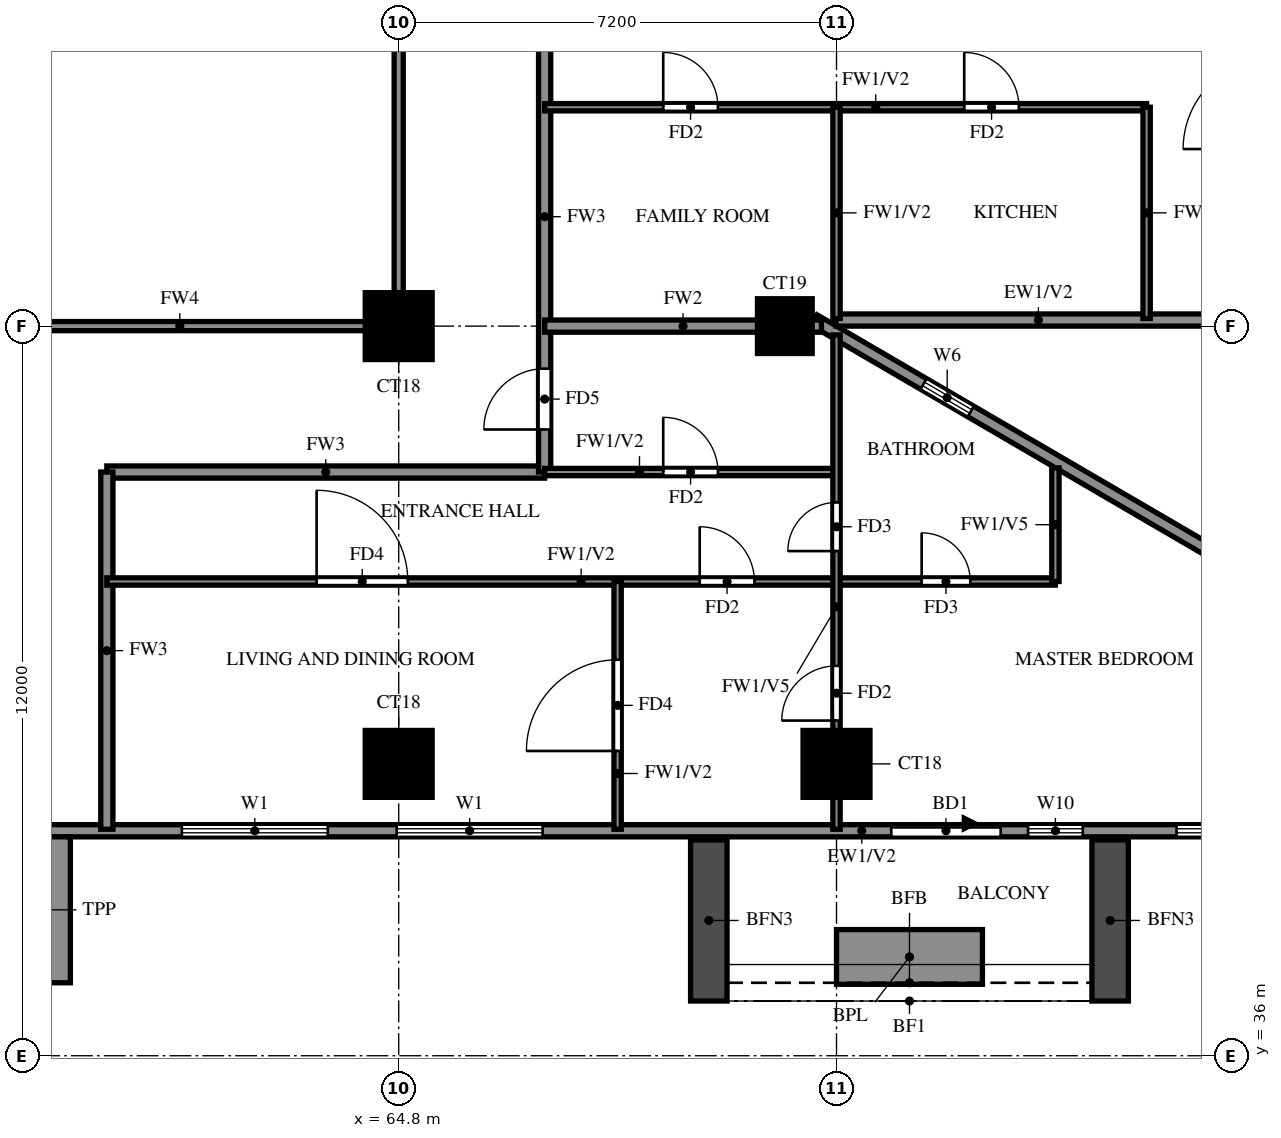
"""IFC4 building model, lengths in metres.
Left out: names, types, materials, properties, quantities, classifications, styles, units other than length and angle.
Written with IfcOpenShell. Run it as: python <this file> out.ifc"""

import sys

from ifc_helpers import new_model, si_unit, direction, frame, frame_2d, origin, origin_2d, place, context, subcontext, project, spatial, rectangle, extrude, source, transform, mapped, element, fill, save


model = new_model("IFC4")
c1 = context("Model", 3, precision=1e-05, world=origin(), true_north=direction((0.0, 1.0)))
c2 = subcontext(c1, "Body", "Model", "MODEL_VIEW")
j1 = project(units=[si_unit("LENGTHUNIT", "METRE"), si_unit("PLANEANGLEUNIT", "RADIAN")], contexts=[c1])
p1 = place(None, origin())
s1 = spatial("IfcSite", under=j1, at=p1, CompositionType="ELEMENT")
p2 = place(p1, origin())
s2 = spatial("IfcBuilding", under=s1, at=p2, CompositionType="ELEMENT")
p3 = place(p2, frame((0.0, 0.0, 123.5)))
s3 = spatial("IfcBuildingStorey", under=s2, at=p3, CompositionType="ELEMENT", Elevation=123.5)
m1 = source(origin(), c2, "Body", "SweptSolid", [
    extrude(rectangle(XDim=1.1, YDim=1.1, at=origin_2d()), origin(), (0.0, 0.0, 1.0), 3.2),
])
for number, where, z_axis, x_axis in (
    (1, (64.8, 40.8, 0.0), (0.0, 0.0, 1.0), (1.0, 0.0, 0.0)),
    (2, (72.0, 40.8, 0.0), (0.0, 0.0, 1.0), (1.0, 0.0, 0.0)),
    (3, (64.8, 48.0, 0.0), (0.0, 0.0, 1.0), (1.0, 0.0, 0.0)),
):
    element("IfcColumn", number, at=place(p3, frame(where, z_axis=z_axis, x_axis=x_axis)), inside=s3, PredefinedType="COLUMN", context=c2, shape_type="MappedRepresentation", body=[
        mapped(m1, transform((0.0, 0.0, 0.0))),
    ])
m2 = source(origin(), c2, "Body", "SweptSolid", [
    extrude(rectangle(XDim=0.9, YDim=0.9, at=origin_2d()), origin(), (0.0, 0.0, 1.0), 3.2),
])
p4 = place(p3, frame((71.15, 48.0, 0.0), z_axis=(0.0, 0.0, 1.0), x_axis=(1.0, 0.0, 0.0)))
e4 = element("IfcColumn", 4, at=p4, inside=s3, PredefinedType="COLUMN", context=c2, shape_type="MappedRepresentation", body=[
    mapped(m2, transform((0.0, 0.0, 0.0))),
])
p5 = place(p3, frame((85.719, 39.881, 0.0), z_axis=(0.0, 0.0, 1.0), x_axis=(-0.86377618652, 0.503875678716, 0.0)))
e5 = element("IfcWall", 5, at=p5, inside=s3, PredefinedType="SOLIDWALL", context=c2, shape_type="SweptSolid", body=[
    extrude(rectangle(XDim=16.311, YDim=0.2, at=frame_2d((8.156, 0.0))), origin(), (0.0, 0.0, 1.0), 3.2),
])
p6 = place(p5, frame((13.326, 0.0, 1.5)))
e6 = element("IfcOpeningElement", 6, at=p6, cuts=e5, PredefinedType="OPENING", context=c2, shape_type="SweptSolid", body=[
    extrude(rectangle(XDim=0.9, YDim=0.9, at=frame_2d((0.45, 0.45))), frame((0.0, 0.11, 0.0), z_axis=(0.0, -1.0, 0.0), x_axis=(1.0, 0.0, 0.0)), (0.0, 0.0, 1.0), 0.22),
])
p7 = place(p3, frame((71.99, 48.1, 0.0), z_axis=(0.0, 0.0, 1.0), x_axis=(1.0, 0.0, 0.0)))
e7 = element("IfcWall", 7, at=p7, inside=s3, PredefinedType="SOLIDWALL", context=c2, shape_type="SweptSolid", body=[
    extrude(rectangle(XDim=6.66, YDim=0.2, at=frame_2d((3.33, 0.0))), origin(), (0.0, 0.0, 1.0), 3.2),
])
p8 = place(p3, frame((58.8, 39.7, 0.0), z_axis=(0.0, 0.0, 1.0), x_axis=(1.0, 0.0, 0.0)))
e8 = element("IfcWall", 8, at=p8, inside=s3, PredefinedType="SOLIDWALL", context=c2, shape_type="SweptSolid", body=[
    extrude(rectangle(XDim=27.23, YDim=0.2, at=frame_2d((13.615, 0.0))), origin(), (0.0, 0.0, 1.0), 3.2),
])
p9 = place(p8, frame((14.1, 0.0, 0.0)))
e9 = element("IfcOpeningElement", 9, at=p9, cuts=e8, PredefinedType="OPENING", context=c2, shape_type="SweptSolid", body=[
    extrude(rectangle(XDim=1.8, YDim=2.4, at=frame_2d((0.9, 1.2))), frame((0.0, 0.11, 0.0), z_axis=(0.0, -1.0, 0.0), x_axis=(1.0, 0.0, 0.0)), (0.0, 0.0, 1.0), 0.22),
])
p10 = place(p8, frame((2.433, 0.0, 0.6)))
e10 = element("IfcOpeningElement", 10, at=p10, cuts=e8, PredefinedType="OPENING", context=c2, shape_type="SweptSolid", body=[
    extrude(rectangle(XDim=2.4, YDim=2.4, at=frame_2d((1.2, 1.2))), frame((0.0, 0.11, 0.0), z_axis=(0.0, -1.0, 0.0), x_axis=(1.0, 0.0, 0.0)), (0.0, 0.0, 1.0), 0.22),
])
p11 = place(p8, frame((5.967, 0.0, 0.6)))
e11 = element("IfcOpeningElement", 11, at=p11, cuts=e8, PredefinedType="OPENING", context=c2, shape_type="SweptSolid", body=[
    extrude(rectangle(XDim=2.4, YDim=2.4, at=frame_2d((1.2, 1.2))), frame((0.0, 0.11, 0.0), z_axis=(0.0, -1.0, 0.0), x_axis=(1.0, 0.0, 0.0)), (0.0, 0.0, 1.0), 0.22),
])
p12 = place(p8, frame((16.35, 0.0, 0.6)))
e12 = element("IfcOpeningElement", 12, at=p12, cuts=e8, PredefinedType="OPENING", context=c2, shape_type="SweptSolid", body=[
    extrude(rectangle(XDim=0.9, YDim=2.4, at=frame_2d((0.45, 1.2))), frame((0.0, 0.11, 0.0), z_axis=(0.0, -1.0, 0.0), x_axis=(1.0, 0.0, 0.0)), (0.0, 0.0, 1.0), 0.22),
])
p13 = place(p8, frame((18.792, 0.0, 0.6)))
e13 = element("IfcOpeningElement", 13, at=p13, cuts=e8, PredefinedType="OPENING", context=c2, shape_type="SweptSolid", body=[
    extrude(rectangle(XDim=2.4, YDim=2.4, at=frame_2d((1.2, 1.2))), frame((0.0, 0.11, 0.0), z_axis=(0.0, -1.0, 0.0), x_axis=(1.0, 0.0, 0.0)), (0.0, 0.0, 1.0), 0.22),
])
p14 = place(p8, frame((21.884, 0.0, 0.6)))
e14 = element("IfcOpeningElement", 14, at=p14, cuts=e8, PredefinedType="OPENING", context=c2, shape_type="SweptSolid", body=[
    extrude(rectangle(XDim=2.4, YDim=2.4, at=frame_2d((1.2, 1.2))), frame((0.0, 0.11, 0.0), z_axis=(0.0, -1.0, 0.0), x_axis=(1.0, 0.0, 0.0)), (0.0, 0.0, 1.0), 0.22),
])
p15 = place(p8, frame((26.003, 0.0, 0.6)))
e15 = element("IfcOpeningElement", 15, at=p15, cuts=e8, PredefinedType="OPENING", context=c2, shape_type="SweptSolid", body=[
    extrude(rectangle(XDim=0.9, YDim=2.4, at=frame_2d((0.45, 1.2))), frame((0.0, 0.11, 0.0), z_axis=(0.0, -1.0, 0.0), x_axis=(1.0, 0.0, 0.0)), (0.0, 0.0, 1.0), 0.22),
])
for number, where, z_axis, x_axis in (
    (16, (69.9, 39.55, 0.0), (0.0, 0.0, 1.0), (0.0, -1.0, 0.0)),
    (17, (76.5, 39.55, 0.0), (0.0, 0.0, 1.0), (0.0, -1.0, 0.0)),
):
    element("IfcWall", number, at=place(p3, frame(where, z_axis=z_axis, x_axis=x_axis)), inside=s3, PredefinedType="SOLIDWALL", context=c2, shape_type="SweptSolid", body=[
        extrude(rectangle(XDim=2.65, YDim=0.6, at=frame_2d((1.325, 0.0))), origin(), (0.0, 0.0, 1.0), 2.85),
    ])
p16 = place(p3, frame((72.0, 37.625, 0.0), z_axis=(0.0, 0.0, 1.0), x_axis=(1.0, 0.0, 0.0)))
e18 = element("IfcWall", 18, at=p16, inside=s3, PredefinedType="SOLIDWALL", context=c2, shape_type="SweptSolid", body=[
    extrude(rectangle(XDim=2.4, YDim=0.9, at=frame_2d((1.2, 0.0))), origin(), (0.0, 0.0, 1.0), 0.9),
])
p17 = place(p3, frame((58.5, 37.2, -0.3), z_axis=(0.0, 0.0, 1.0), x_axis=(0.0, 1.0, 0.0)))
e19 = element("IfcWall", 19, at=p17, inside=s3, PredefinedType="SOLIDWALL", context=c2, shape_type="SweptSolid", body=[
    extrude(rectangle(XDim=2.4, YDim=1.8, at=frame_2d((1.2, 0.0))), origin(), (0.0, 0.0, 1.0), 3.5),
])
p18 = place(p3, frame((60.0, 45.6, 0.0), z_axis=(0.0, 0.0, 1.0), x_axis=(1.0, 0.0, 0.0)))
e20 = element("IfcWall", 20, at=p18, inside=s3, PredefinedType="SOLIDWALL", context=c2, shape_type="SweptSolid", body=[
    extrude(rectangle(XDim=7.2, YDim=0.2, at=frame_2d((3.6, 0.0))), origin(), (0.0, 0.0, 1.0), 3.2),
])
p19 = place(p3, frame((60.0, 39.725, 0.0), z_axis=(0.0, 0.0, 1.0), x_axis=(0.0, 1.0, 0.0)))
e21 = element("IfcWall", 21, at=p19, inside=s3, PredefinedType="SOLIDWALL", context=c2, shape_type="SweptSolid", body=[
    extrude(rectangle(XDim=5.875, YDim=0.2, at=frame_2d((2.938, 0.0))), origin(), (0.0, 0.0, 1.0), 3.2),
])
p20 = place(p3, frame((67.2, 45.6, 0.0), z_axis=(0.0, 0.0, 1.0), x_axis=(0.0, 1.0, 0.0)))
e22 = element("IfcWall", 22, at=p20, inside=s3, PredefinedType="SOLIDWALL", context=c2, shape_type="SweptSolid", body=[
    extrude(rectangle(XDim=8.4, YDim=0.2, at=frame_2d((4.2, 0.0))), origin(), (0.0, 0.0, 1.0), 3.2),
])
p21 = place(p20, frame((0.7, 0.0, 0.0)))
e23 = element("IfcOpeningElement", 23, at=p21, cuts=e22, PredefinedType="OPENING", context=c2, shape_type="SweptSolid", body=[
    extrude(rectangle(XDim=1.0, YDim=2.1, at=frame_2d((0.5, 1.05))), frame((0.0, 0.11, 0.0), z_axis=(0.0, -1.0, 0.0), x_axis=(1.0, 0.0, 0.0)), (0.0, 0.0, 1.0), 0.22),
])
p22 = place(p3, frame((67.2, 48.0, 0.0), z_axis=(0.0, 0.0, 1.0), x_axis=(1.0, 0.0, 0.0)))
e24 = element("IfcWall", 24, at=p22, inside=s3, PredefinedType="SOLIDWALL", context=c2, shape_type="SweptSolid", body=[
    extrude(rectangle(XDim=4.552, YDim=0.2, at=frame_2d((2.276, 0.0))), origin(), (0.0, 0.0, 1.0), 3.2),
])
p23 = place(p3, frame((60.0, 43.8, 0.0), z_axis=(0.0, 0.0, 1.0), x_axis=(1.0, 0.0, 0.0)))
e25 = element("IfcWall", 25, at=p23, inside=s3, PredefinedType="PARTITIONING", context=c2, shape_type="SweptSolid", body=[
    extrude(rectangle(XDim=15.6, YDim=0.12, at=frame_2d((7.8, 0.0))), origin(), (0.0, 0.0, 1.0), 3.2),
])
p24 = place(p23, frame((9.75, 0.0, 0.0)))
e26 = element("IfcOpeningElement", 26, at=p24, cuts=e25, PredefinedType="OPENING", context=c2, shape_type="SweptSolid", body=[
    extrude(rectangle(XDim=0.9, YDim=2.1, at=frame_2d((0.45, 1.05))), frame((0.0, 0.07, 0.0), z_axis=(0.0, -1.0, 0.0), x_axis=(1.0, 0.0, 0.0)), (0.0, 0.0, 1.0), 0.14),
])
p25 = place(p23, frame((3.45, 0.0, 0.0)))
e27 = element("IfcOpeningElement", 27, at=p25, cuts=e25, PredefinedType="OPENING", context=c2, shape_type="SweptSolid", body=[
    extrude(rectangle(XDim=1.5, YDim=2.1, at=frame_2d((0.75, 1.05))), frame((0.0, 0.07, 0.0), z_axis=(0.0, -1.0, 0.0), x_axis=(1.0, 0.0, 0.0)), (0.0, 0.0, 1.0), 0.14),
])
p26 = place(p23, frame((13.4, 0.0, 0.0)))
e28 = element("IfcOpeningElement", 28, at=p26, cuts=e25, PredefinedType="OPENING", context=c2, shape_type="SweptSolid", body=[
    extrude(rectangle(XDim=0.8, YDim=2.1, at=frame_2d((0.4, 1.05))), frame((0.0, 0.07, 0.0), z_axis=(0.0, -1.0, 0.0), x_axis=(1.0, 0.0, 0.0)), (0.0, 0.0, 1.0), 0.14),
])
p27 = place(p3, frame((67.2, 45.6, 0.0), z_axis=(0.0, 0.0, 1.0), x_axis=(1.0, 0.0, 0.0)))
e29 = element("IfcWall", 29, at=p27, inside=s3, PredefinedType="PARTITIONING", context=c2, shape_type="SweptSolid", body=[
    extrude(rectangle(XDim=4.8, YDim=0.12, at=frame_2d((2.4, 0.0))), origin(), (0.0, 0.0, 1.0), 3.2),
])
p28 = place(p27, frame((1.95, 0.0, 0.0)))
e30 = element("IfcOpeningElement", 30, at=p28, cuts=e29, PredefinedType="OPENING", context=c2, shape_type="SweptSolid", body=[
    extrude(rectangle(XDim=0.9, YDim=2.1, at=frame_2d((0.45, 1.05))), frame((0.0, 0.07, 0.0), z_axis=(0.0, -1.0, 0.0), x_axis=(1.0, 0.0, 0.0)), (0.0, 0.0, 1.0), 0.14),
])
p29 = place(p3, frame((67.2, 51.6, 0.0), z_axis=(0.0, 0.0, 1.0), x_axis=(1.0, 0.0, 0.0)))
e31 = element("IfcWall", 31, at=p29, inside=s3, PredefinedType="PARTITIONING", context=c2, shape_type="SweptSolid", body=[
    extrude(rectangle(XDim=9.9, YDim=0.12, at=frame_2d((4.95, 0.0))), origin(), (0.0, 0.0, 1.0), 3.2),
])
p30 = place(p29, frame((6.9, 0.0, 0.0)))
e32 = element("IfcOpeningElement", 32, at=p30, cuts=e31, PredefinedType="OPENING", context=c2, shape_type="SweptSolid", body=[
    extrude(rectangle(XDim=0.9, YDim=2.1, at=frame_2d((0.45, 1.05))), frame((0.0, 0.07, 0.0), z_axis=(0.0, -1.0, 0.0), x_axis=(1.0, 0.0, 0.0)), (0.0, 0.0, 1.0), 0.14),
])
p31 = place(p29, frame((1.95, 0.0, 0.0)))
e33 = element("IfcOpeningElement", 33, at=p31, cuts=e31, PredefinedType="OPENING", context=c2, shape_type="SweptSolid", body=[
    extrude(rectangle(XDim=0.9, YDim=2.1, at=frame_2d((0.45, 1.05))), frame((0.0, 0.07, 0.0), z_axis=(0.0, -1.0, 0.0), x_axis=(1.0, 0.0, 0.0)), (0.0, 0.0, 1.0), 0.14),
])
p32 = place(p3, frame((68.4, 39.725, 0.0), z_axis=(0.0, 0.0, 1.0), x_axis=(0.0, 1.0, 0.0)))
e34 = element("IfcWall", 34, at=p32, inside=s3, PredefinedType="PARTITIONING", context=c2, shape_type="SweptSolid", body=[
    extrude(rectangle(XDim=4.075, YDim=0.12, at=frame_2d((2.038, 0.0))), origin(), (0.0, 0.0, 1.0), 3.2),
])
p33 = place(p32, frame((1.288, 0.0, 0.0)))
e35 = element("IfcOpeningElement", 35, at=p33, cuts=e34, PredefinedType="OPENING", context=c2, shape_type="SweptSolid", body=[
    extrude(rectangle(XDim=1.5, YDim=2.1, at=frame_2d((0.75, 1.05))), frame((0.0, 0.07, 0.0), z_axis=(0.0, -1.0, 0.0), x_axis=(1.0, 0.0, 0.0)), (0.0, 0.0, 1.0), 0.14),
])
p34 = place(p3, frame((72.0, 39.725, 0.0), z_axis=(0.0, 0.0, 1.0), x_axis=(0.0, 1.0, 0.0)))
e36 = element("IfcWall", 36, at=p34, inside=s3, PredefinedType="PARTITIONING", context=c2, shape_type="SweptSolid", body=[
    extrude(rectangle(XDim=8.13, YDim=0.12, at=frame_2d((4.065, 0.0))), origin(), (0.0, 0.0, 1.0), 2.3),
])
p35 = place(p34, frame((1.788, 0.0, 0.0)))
e37 = element("IfcOpeningElement", 37, at=p35, cuts=e36, PredefinedType="OPENING", context=c2, shape_type="SweptSolid", body=[
    extrude(rectangle(XDim=0.9, YDim=2.1, at=frame_2d((0.45, 1.05))), frame((0.0, 0.07, 0.0), z_axis=(0.0, -1.0, 0.0), x_axis=(1.0, 0.0, 0.0)), (0.0, 0.0, 1.0), 0.14),
])
p36 = place(p34, frame((4.575, 0.0, 0.0)))
e38 = element("IfcOpeningElement", 38, at=p36, cuts=e36, PredefinedType="OPENING", context=c2, shape_type="SweptSolid", body=[
    extrude(rectangle(XDim=0.8, YDim=2.1, at=frame_2d((0.4, 1.05))), frame((0.0, 0.07, 0.0), z_axis=(0.0, -1.0, 0.0), x_axis=(1.0, 0.0, 0.0)), (0.0, 0.0, 1.0), 0.14),
])
p37 = place(p3, frame((72.0, 48.125, 0.0), z_axis=(0.0, 0.0, 1.0), x_axis=(0.0, 1.0, 0.0)))
e39 = element("IfcWall", 39, at=p37, inside=s3, PredefinedType="PARTITIONING", context=c2, shape_type="SweptSolid", body=[
    extrude(rectangle(XDim=3.475, YDim=0.12, at=frame_2d((1.738, 0.0))), origin(), (0.0, 0.0, 1.0), 3.2),
])
p38 = place(p3, frame((75.6, 43.8, 0.0), z_axis=(0.0, 0.0, 1.0), x_axis=(0.0, 1.0, 0.0)))
e40 = element("IfcWall", 40, at=p38, inside=s3, PredefinedType="PARTITIONING", context=c2, shape_type="SweptSolid", body=[
    extrude(rectangle(XDim=1.868, YDim=0.12, at=frame_2d((0.934, 0.0))), origin(), (0.0, 0.0, 1.0), 2.3),
])
p39 = place(p3, frame((77.1, 48.125, 0.0), z_axis=(0.0, 0.0, 1.0), x_axis=(0.0, 1.0, 0.0)))
e41 = element("IfcWall", 41, at=p39, inside=s3, PredefinedType="PARTITIONING", context=c2, shape_type="SweptSolid", body=[
    extrude(rectangle(XDim=3.475, YDim=0.12, at=frame_2d((1.738, 0.0))), origin(), (0.0, 0.0, 1.0), 3.2),
])
p40 = place(p3, frame((57.6, 48.0, 0.0), z_axis=(0.0, 0.0, 1.0), x_axis=(1.0, 0.0, 0.0)))
e42 = element("IfcWall", 42, at=p40, inside=s3, PredefinedType="SOLIDWALL", context=c2, shape_type="SweptSolid", body=[
    extrude(rectangle(XDim=7.2, YDim=0.15, at=frame_2d((3.6, 0.0))), origin(), (0.0, 0.0, 1.0), 2.3),
])
p41 = place(p3, frame((64.8, 48.0, 0.0), z_axis=(0.0, 0.0, 1.0), x_axis=(0.0, 1.0, 0.0)))
e43 = element("IfcWall", 43, at=p41, inside=s3, PredefinedType="SOLIDWALL", context=c2, shape_type="SweptSolid", body=[
    extrude(rectangle(XDim=14.4, YDim=0.15, at=frame_2d((7.2, 0.0))), origin(), (0.0, 0.0, 1.0), 2.3),
])
p42 = place(p6, origin())
e44 = element("IfcWindow", 44, at=p42, inside=s3, PartitioningType="SINGLE_PANEL", PredefinedType="WINDOW", context=c2, shape_type="SweptSolid", body=[
    extrude(rectangle(XDim=0.9, YDim=0.9, at=frame_2d((0.45, 0.45))), frame((0.0, 0.03, 0.0), z_axis=(0.0, -1.0, 0.0), x_axis=(1.0, 0.0, 0.0)), (0.0, 0.0, 1.0), 0.06),
])
fill(e6, e44)
p43 = place(p9, origin())
e45 = element("IfcDoor", 45, at=p43, inside=s3, OperationType="DOUBLE_DOOR_SLIDING", PredefinedType="DOOR", context=c2, shape_type="SweptSolid", body=[
    extrude(rectangle(XDim=1.8, YDim=2.4, at=frame_2d((0.9, 1.2))), frame((0.0, 0.025, 0.0), z_axis=(0.0, -1.0, 0.0), x_axis=(1.0, 0.0, 0.0)), (0.0, 0.0, 1.0), 0.05),
])
fill(e9, e45)
p44 = place(p10, origin())
e46 = element("IfcWindow", 46, at=p44, inside=s3, PartitioningType="DOUBLE_PANEL_VERTICAL", PredefinedType="WINDOW", context=c2, shape_type="SweptSolid", body=[
    extrude(rectangle(XDim=2.4, YDim=2.4, at=frame_2d((1.2, 1.2))), frame((0.0, 0.03, 0.0), z_axis=(0.0, -1.0, 0.0), x_axis=(1.0, 0.0, 0.0)), (0.0, 0.0, 1.0), 0.06),
])
fill(e10, e46)
p45 = place(p11, origin())
e47 = element("IfcWindow", 47, at=p45, inside=s3, PartitioningType="DOUBLE_PANEL_VERTICAL", PredefinedType="WINDOW", context=c2, shape_type="SweptSolid", body=[
    extrude(rectangle(XDim=2.4, YDim=2.4, at=frame_2d((1.2, 1.2))), frame((0.0, 0.03, 0.0), z_axis=(0.0, -1.0, 0.0), x_axis=(1.0, 0.0, 0.0)), (0.0, 0.0, 1.0), 0.06),
])
fill(e11, e47)
p46 = place(p12, origin())
e48 = element("IfcWindow", 48, at=p46, inside=s3, PartitioningType="SINGLE_PANEL", PredefinedType="WINDOW", context=c2, shape_type="SweptSolid", body=[
    extrude(rectangle(XDim=0.9, YDim=2.4, at=frame_2d((0.45, 1.2))), frame((0.0, 0.03, 0.0), z_axis=(0.0, -1.0, 0.0), x_axis=(1.0, 0.0, 0.0)), (0.0, 0.0, 1.0), 0.06),
])
fill(e12, e48)
p47 = place(p13, origin())
e49 = element("IfcWindow", 49, at=p47, inside=s3, PartitioningType="DOUBLE_PANEL_VERTICAL", PredefinedType="WINDOW", context=c2, shape_type="SweptSolid", body=[
    extrude(rectangle(XDim=2.4, YDim=2.4, at=frame_2d((1.2, 1.2))), frame((0.0, 0.03, 0.0), z_axis=(0.0, -1.0, 0.0), x_axis=(1.0, 0.0, 0.0)), (0.0, 0.0, 1.0), 0.06),
])
fill(e13, e49)
p48 = place(p30, origin())
e50 = element("IfcDoor", 50, at=p48, inside=s3, OperationType="SINGLE_SWING_LEFT", PredefinedType="DOOR", context=c2, shape_type="SweptSolid", body=[
    extrude(rectangle(XDim=0.9, YDim=2.1, at=frame_2d((0.45, 1.05))), frame((0.0, 0.025, 0.0), z_axis=(0.0, -1.0, 0.0), x_axis=(1.0, 0.0, 0.0)), (0.0, 0.0, 1.0), 0.05),
])
fill(e32, e50)
p49 = place(p31, origin())
e51 = element("IfcDoor", 51, at=p49, inside=s3, OperationType="SINGLE_SWING_LEFT", PredefinedType="DOOR", context=c2, shape_type="SweptSolid", body=[
    extrude(rectangle(XDim=0.9, YDim=2.1, at=frame_2d((0.45, 1.05))), frame((0.0, 0.025, 0.0), z_axis=(0.0, -1.0, 0.0), x_axis=(1.0, 0.0, 0.0)), (0.0, 0.0, 1.0), 0.05),
])
fill(e33, e51)
p50 = place(p33, origin())
e52 = element("IfcDoor", 52, at=p50, inside=s3, OperationType="SINGLE_SWING_RIGHT", PredefinedType="DOOR", context=c2, shape_type="SweptSolid", body=[
    extrude(rectangle(XDim=1.5, YDim=2.1, at=frame_2d((0.75, 1.05))), frame((0.0, 0.025, 0.0), z_axis=(0.0, -1.0, 0.0), x_axis=(1.0, 0.0, 0.0)), (0.0, 0.0, 1.0), 0.05),
])
fill(e35, e52)
p51 = place(p28, origin())
e53 = element("IfcDoor", 53, at=p51, inside=s3, OperationType="SINGLE_SWING_LEFT", PredefinedType="DOOR", context=c2, shape_type="SweptSolid", body=[
    extrude(rectangle(XDim=0.9, YDim=2.1, at=frame_2d((0.45, 1.05))), frame((0.0, 0.025, 0.0), z_axis=(0.0, -1.0, 0.0), x_axis=(1.0, 0.0, 0.0)), (0.0, 0.0, 1.0), 0.05),
])
fill(e30, e53)
p52 = place(p21, origin())
e54 = element("IfcDoor", 54, at=p52, inside=s3, OperationType="SINGLE_SWING_LEFT", PredefinedType="DOOR", context=c2, shape_type="SweptSolid", body=[
    extrude(rectangle(XDim=1.0, YDim=2.1, at=frame_2d((0.5, 1.05))), frame((0.0, 0.025, 0.0), z_axis=(0.0, -1.0, 0.0), x_axis=(1.0, 0.0, 0.0)), (0.0, 0.0, 1.0), 0.05),
])
fill(e23, e54)
p53 = place(p24, origin())
e55 = element("IfcDoor", 55, at=p53, inside=s3, OperationType="SINGLE_SWING_RIGHT", PredefinedType="DOOR", context=c2, shape_type="SweptSolid", body=[
    extrude(rectangle(XDim=0.9, YDim=2.1, at=frame_2d((0.45, 1.05))), frame((0.0, 0.025, 0.0), z_axis=(0.0, -1.0, 0.0), x_axis=(1.0, 0.0, 0.0)), (0.0, 0.0, 1.0), 0.05),
])
fill(e26, e55)
p54 = place(p25, origin())
e56 = element("IfcDoor", 56, at=p54, inside=s3, OperationType="SINGLE_SWING_LEFT", PredefinedType="DOOR", context=c2, shape_type="SweptSolid", body=[
    extrude(rectangle(XDim=1.5, YDim=2.1, at=frame_2d((0.75, 1.05))), frame((0.0, 0.025, 0.0), z_axis=(0.0, -1.0, 0.0), x_axis=(1.0, 0.0, 0.0)), (0.0, 0.0, 1.0), 0.05),
])
fill(e27, e56)
p55 = place(p35, origin())
e57 = element("IfcDoor", 57, at=p55, inside=s3, OperationType="SINGLE_SWING_RIGHT", PredefinedType="DOOR", context=c2, shape_type="SweptSolid", body=[
    extrude(rectangle(XDim=0.9, YDim=2.1, at=frame_2d((0.45, 1.05))), frame((0.0, 0.025, 0.0), z_axis=(0.0, -1.0, 0.0), x_axis=(1.0, 0.0, 0.0)), (0.0, 0.0, 1.0), 0.05),
])
fill(e37, e57)
p56 = place(p36, origin())
e58 = element("IfcDoor", 58, at=p56, inside=s3, OperationType="SINGLE_SWING_RIGHT", PredefinedType="DOOR", context=c2, shape_type="SweptSolid", body=[
    extrude(rectangle(XDim=0.8, YDim=2.1, at=frame_2d((0.4, 1.05))), frame((0.0, 0.025, 0.0), z_axis=(0.0, -1.0, 0.0), x_axis=(1.0, 0.0, 0.0)), (0.0, 0.0, 1.0), 0.05),
])
fill(e38, e58)
p57 = place(p26, origin())
e59 = element("IfcDoor", 59, at=p57, inside=s3, OperationType="SINGLE_SWING_LEFT", PredefinedType="DOOR", context=c2, shape_type="SweptSolid", body=[
    extrude(rectangle(XDim=0.8, YDim=2.1, at=frame_2d((0.4, 1.05))), frame((0.0, 0.025, 0.0), z_axis=(0.0, -1.0, 0.0), x_axis=(1.0, 0.0, 0.0)), (0.0, 0.0, 1.0), 0.05),
])
fill(e28, e59)
save(model, sys.argv[1])
